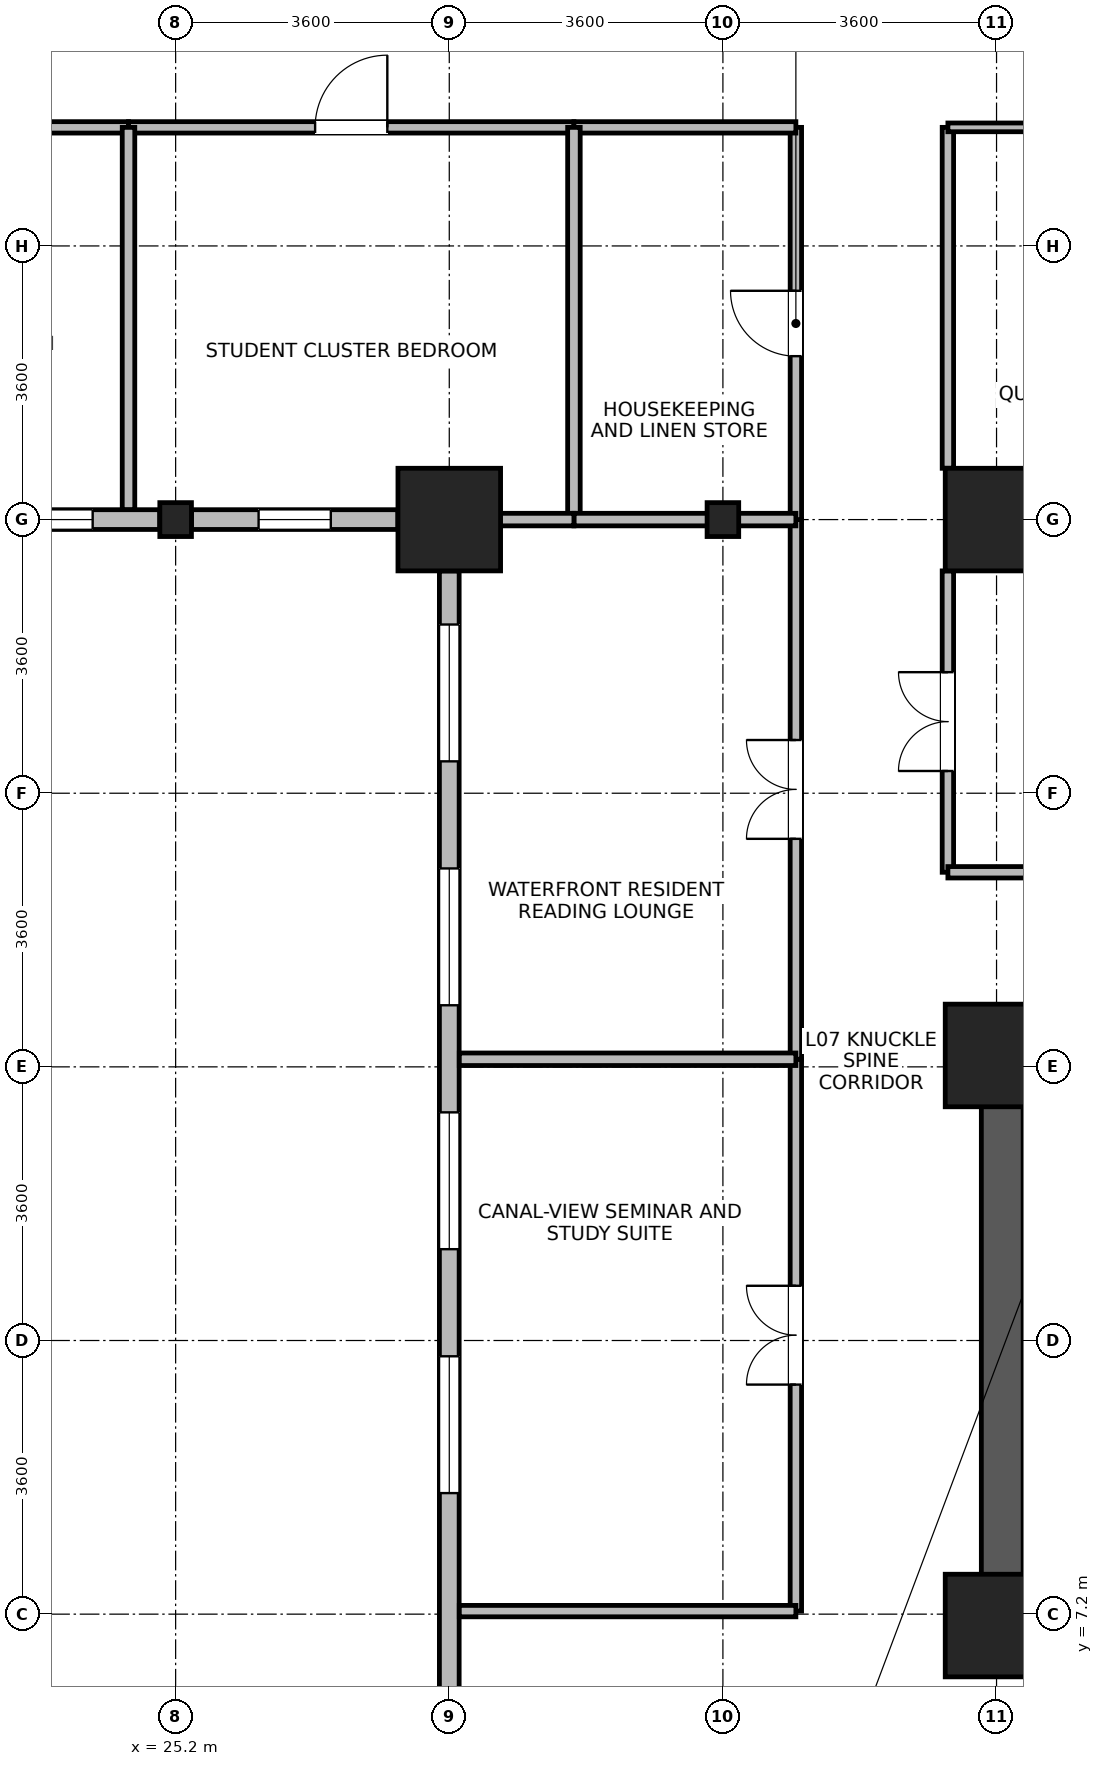
"""IFC4 building model, lengths in metres.
Left out: names, types, materials, properties, quantities, classifications, styles, units other than length and angle.
Written with IfcOpenShell. Run it as: python <this file> out.ifc"""

import sys

from ifc_helpers import new_model, si_unit, direction, frame, frame_2d, origin, origin_2d, place, context, subcontext, project, spatial, rectangle, i_section, extrude, source, transform, mapped, element, fill, save


model = new_model("IFC4")
c1 = context("Model", 3, precision=1e-05, world=origin(), true_north=direction((0.0, 1.0)))
c2 = subcontext(c1, "Body", "Model", "MODEL_VIEW")
j1 = project(units=[si_unit("LENGTHUNIT", "METRE"), si_unit("PLANEANGLEUNIT", "RADIAN")], contexts=[c1])
p1 = place(None, origin())
s1 = spatial("IfcSite", under=j1, at=p1, CompositionType="ELEMENT")
p2 = place(p1, origin())
s2 = spatial("IfcBuilding", under=s1, at=p2, CompositionType="ELEMENT")
p3 = place(p2, frame((0.0, 0.0, 32.7)))
s3 = spatial("IfcBuildingStorey", under=s2, at=p3, CompositionType="ELEMENT", Elevation=32.7)
p4 = place(p3, frame((36.075, 6.75, 0.0), z_axis=(0.0, 0.0, 1.0), x_axis=(0.0, 1.0, 0.0)))
e1 = element("IfcWall", 1, at=p4, inside=s3, PredefinedType="SHEAR", context=c2, shape_type="SweptSolid", body=[
    extrude(rectangle(XDim=8.1, YDim=0.55, at=frame_2d((4.05, 0.0))), origin(), (0.0, 0.0, 1.0), 3.45),
])
m1 = source(origin(), c2, "Body", "SweptSolid", [
    extrude(rectangle(XDim=1.35, YDim=1.35, at=origin_2d()), origin(), (0.0, 0.0, 1.0), 3.7),
])
for number, where, z_axis, x_axis in (
    (2, (28.8, 21.6, 0.0), (0.0, 0.0, 1.0), (1.0, 0.0, 0.0)),
    (3, (36.0, 21.6, 0.0), (0.0, 0.0, 1.0), (1.0, 0.0, 0.0)),
    (4, (36.0, 7.05, 0.0), (0.0, 0.0, 1.0), (1.0, 0.0, 0.0)),
    (5, (36.0, 14.55, 0.0), (0.0, 0.0, 1.0), (1.0, 0.0, 0.0)),
):
    element("IfcColumn", number, at=place(p3, frame(where, z_axis=z_axis, x_axis=x_axis)), inside=s3, PredefinedType="COLUMN", context=c2, shape_type="MappedRepresentation", body=[
        mapped(m1, transform((0.0, 0.0, 0.0), x_axis=(1.0, 0.0, 0.0), y_axis=(0.0, 1.0, 0.0), z_axis=(0.0, 0.0, 1.0), scale=1.0)),
    ])
m2 = source(origin(), c2, "Body", "SweptSolid", [
    extrude(i_section(OverallWidth=0.416, OverallDepth=0.446, WebThickness=0.029, FlangeThickness=0.04, FilletRadius=0.015, at=origin_2d()), origin(), (0.0, 0.0, 1.0), 3.7),
])
for number, where, z_axis, x_axis in (
    (6, (25.2, 21.6, 0.0), (0.0, 0.0, 1.0), (1.0, 0.0, 0.0)),
    (7, (32.4, 21.6, 0.0), (0.0, 0.0, 1.0), (1.0, 0.0, 0.0)),
):
    element("IfcColumn", number, at=place(p3, frame(where, z_axis=z_axis, x_axis=x_axis)), inside=s3, PredefinedType="COLUMN", context=c2, shape_type="MappedRepresentation", body=[
        mapped(m2, transform((0.0, 0.0, 0.0), x_axis=(1.0, 0.0, 0.0), y_axis=(0.0, 1.0, 0.0), z_axis=(0.0, 0.0, 1.0), scale=1.0)),
    ])
p5 = place(p3, frame((24.991, 21.6, 0.0), z_axis=(0.0, 0.0, 1.0), x_axis=(-1.0, 0.0, 0.0)))
e8 = element("IfcWall", 8, at=p5, inside=s3, PredefinedType="STANDARD", context=c2, shape_type="SweptSolid", body=[
    extrude(rectangle(XDim=2.715, YDim=0.26, at=frame_2d((1.357, 0.0))), origin(), (0.0, 0.0, 1.0), 2.93),
])
p6 = place(p5, frame((0.883, 0.0, 0.85)))
e9 = element("IfcOpeningElement", 9, at=p6, cuts=e8, PredefinedType="OPENING", context=c2, shape_type="SweptSolid", body=[
    extrude(rectangle(XDim=0.95, YDim=1.75, at=frame_2d((0.475, 0.875))), frame((0.0, 0.14, 0.0), z_axis=(0.0, -1.0, 0.0), x_axis=(1.0, 0.0, 0.0)), (0.0, 0.0, 1.0), 0.28),
])
p7 = place(p3, frame((28.124, 21.6, 0.0), z_axis=(0.0, 0.0, 1.0), x_axis=(-1.0, 0.0, 0.0)))
e10 = element("IfcWall", 10, at=p7, inside=s3, PredefinedType="STANDARD", context=c2, shape_type="SweptSolid", body=[
    extrude(rectangle(XDim=2.715, YDim=0.26, at=frame_2d((1.357, 0.0))), origin(), (0.0, 0.0, 1.0), 2.93),
])
p8 = place(p7, frame((0.883, 0.0, 0.85)))
e11 = element("IfcOpeningElement", 11, at=p8, cuts=e10, PredefinedType="OPENING", context=c2, shape_type="SweptSolid", body=[
    extrude(rectangle(XDim=0.95, YDim=1.75, at=frame_2d((0.475, 0.875))), frame((0.0, 0.14, 0.0), z_axis=(0.0, -1.0, 0.0), x_axis=(1.0, 0.0, 0.0)), (0.0, 0.0, 1.0), 0.28),
])
p9 = place(p3, frame((28.8, 1.67, 0.0), z_axis=(0.0, 0.0, 1.0), x_axis=(0.0, 1.0, 0.0)))
e12 = element("IfcWall", 12, at=p9, inside=s3, PredefinedType="STANDARD", context=c2, shape_type="SweptSolid", body=[
    extrude(rectangle(XDim=19.254, YDim=0.26, at=frame_2d((9.627, 0.0))), origin(), (0.0, 0.0, 1.0), 3.43),
])
p10 = place(p9, frame((0.705, 0.0, 0.85)))
e13 = element("IfcOpeningElement", 13, at=p10, cuts=e12, PredefinedType="OPENING", context=c2, shape_type="SweptSolid", body=[
    extrude(rectangle(XDim=1.8, YDim=1.85, at=frame_2d((0.9, 0.925))), frame((0.0, 0.14, 0.0), z_axis=(0.0, -1.0, 0.0), x_axis=(1.0, 0.0, 0.0)), (0.0, 0.0, 1.0), 0.28),
])
p11 = place(p9, frame((7.123, 0.0, 0.85)))
e14 = element("IfcOpeningElement", 14, at=p11, cuts=e12, PredefinedType="OPENING", context=c2, shape_type="SweptSolid", body=[
    extrude(rectangle(XDim=1.8, YDim=1.85, at=frame_2d((0.9, 0.925))), frame((0.0, 0.14, 0.0), z_axis=(0.0, -1.0, 0.0), x_axis=(1.0, 0.0, 0.0)), (0.0, 0.0, 1.0), 0.28),
])
p12 = place(p9, frame((10.332, 0.0, 0.85)))
e15 = element("IfcOpeningElement", 15, at=p12, cuts=e12, PredefinedType="OPENING", context=c2, shape_type="SweptSolid", body=[
    extrude(rectangle(XDim=1.8, YDim=1.85, at=frame_2d((0.9, 0.925))), frame((0.0, 0.14, 0.0), z_axis=(0.0, -1.0, 0.0), x_axis=(1.0, 0.0, 0.0)), (0.0, 0.0, 1.0), 0.28),
])
p13 = place(p9, frame((13.541, 0.0, 0.85)))
e16 = element("IfcOpeningElement", 16, at=p13, cuts=e12, PredefinedType="OPENING", context=c2, shape_type="SweptSolid", body=[
    extrude(rectangle(XDim=1.8, YDim=1.85, at=frame_2d((0.9, 0.925))), frame((0.0, 0.14, 0.0), z_axis=(0.0, -1.0, 0.0), x_axis=(1.0, 0.0, 0.0)), (0.0, 0.0, 1.0), 0.28),
])
p14 = place(p9, frame((16.75, 0.0, 0.85)))
e17 = element("IfcOpeningElement", 17, at=p14, cuts=e12, PredefinedType="OPENING", context=c2, shape_type="SweptSolid", body=[
    extrude(rectangle(XDim=1.8, YDim=1.85, at=frame_2d((0.9, 0.925))), frame((0.0, 0.14, 0.0), z_axis=(0.0, -1.0, 0.0), x_axis=(1.0, 0.0, 0.0)), (0.0, 0.0, 1.0), 0.28),
])
p15 = place(p3, frame((35.36, 16.96, 0.0), z_axis=(0.0, 0.0, 1.0), x_axis=(0.0, 1.0, 0.0)))
e18 = element("IfcWall", 18, at=p15, inside=s3, PredefinedType="PARTITIONING", context=c2, shape_type="SweptSolid", body=[
    extrude(rectangle(XDim=3.965, YDim=0.15, at=frame_2d((1.982, 0.0))), origin(), (0.0, 0.0, 1.0), 3.43),
])
p16 = place(p15, frame((1.333, 0.0, 0.0)))
e19 = element("IfcOpeningElement", 19, at=p16, cuts=e18, PredefinedType="OPENING", context=c2, shape_type="SweptSolid", body=[
    extrude(rectangle(XDim=1.3, YDim=2.12, at=frame_2d((0.65, 1.06))), frame((0.0, 0.085, 0.0), z_axis=(0.0, -1.0, 0.0), x_axis=(1.0, 0.0, 0.0)), (0.0, 0.0, 1.0), 0.17),
])
p17 = place(p3, frame((35.36, 22.275, 0.0), z_axis=(0.0, 0.0, 1.0), x_axis=(0.0, 1.0, 0.0)))
e20 = element("IfcWall", 20, at=p17, inside=s3, PredefinedType="PARTITIONING", context=c2, shape_type="SweptSolid", body=[
    extrude(rectangle(XDim=4.485, YDim=0.15, at=frame_2d((2.243, 0.0))), origin(), (0.0, 0.0, 1.0), 3.43),
])
p18 = place(p3, frame((33.36, 7.24, 0.0), z_axis=(0.0, 0.0, 1.0), x_axis=(0.0, 1.0, 0.0)))
e21 = element("IfcWall", 21, at=p18, inside=s3, PredefinedType="PARTITIONING", context=c2, shape_type="SweptSolid", body=[
    extrude(rectangle(XDim=7.26, YDim=0.15, at=frame_2d((3.63, 0.0))), origin(), (0.0, 0.0, 1.0), 3.43),
])
p19 = place(p18, frame((2.98, 0.0, 0.0)))
e22 = element("IfcOpeningElement", 22, at=p19, cuts=e21, PredefinedType="OPENING", context=c2, shape_type="SweptSolid", body=[
    extrude(rectangle(XDim=1.3, YDim=2.12, at=frame_2d((0.65, 1.06))), frame((0.0, 0.085, 0.0), z_axis=(0.0, -1.0, 0.0), x_axis=(1.0, 0.0, 0.0)), (0.0, 0.0, 1.0), 0.17),
])
p20 = place(p3, frame((33.36, 14.5, 0.0), z_axis=(0.0, 0.0, 1.0), x_axis=(0.0, 1.0, 0.0)))
e23 = element("IfcWall", 23, at=p20, inside=s3, PredefinedType="PARTITIONING", context=c2, shape_type="SweptSolid", body=[
    extrude(rectangle(XDim=7.1, YDim=0.15, at=frame_2d((3.55, 0.0))), origin(), (0.0, 0.0, 1.0), 3.43),
])
p21 = place(p20, frame((2.9, 0.0, 0.0)))
e24 = element("IfcOpeningElement", 24, at=p21, cuts=e23, PredefinedType="OPENING", context=c2, shape_type="SweptSolid", body=[
    extrude(rectangle(XDim=1.3, YDim=2.12, at=frame_2d((0.65, 1.06))), frame((0.0, 0.085, 0.0), z_axis=(0.0, -1.0, 0.0), x_axis=(1.0, 0.0, 0.0)), (0.0, 0.0, 1.0), 0.17),
])
p22 = place(p3, frame((18.2, 26.76, 0.0), z_axis=(0.0, 0.0, 1.0), x_axis=(1.0, 0.0, 0.0)))
e25 = element("IfcWall", 25, at=p22, inside=s3, PredefinedType="PARTITIONING", context=c2, shape_type="SweptSolid", body=[
    extrude(rectangle(XDim=6.38, YDim=0.15, at=frame_2d((3.19, 0.0))), origin(), (0.0, 0.0, 1.0), 3.43),
])
p23 = place(p22, frame((2.54, 0.0, 0.0)))
e26 = element("IfcOpeningElement", 26, at=p23, cuts=e25, PredefinedType="OPENING", context=c2, shape_type="SweptSolid", body=[
    extrude(rectangle(XDim=1.3, YDim=2.12, at=frame_2d((0.65, 1.06))), frame((0.0, 0.085, 0.0), z_axis=(0.0, -1.0, 0.0), x_axis=(1.0, 0.0, 0.0)), (0.0, 0.0, 1.0), 0.17),
])
p24 = place(p3, frame((24.58, 26.76, 0.0), z_axis=(0.0, 0.0, 1.0), x_axis=(1.0, 0.0, 0.0)))
e27 = element("IfcWall", 27, at=p24, inside=s3, PredefinedType="PARTITIONING", context=c2, shape_type="SweptSolid", body=[
    extrude(rectangle(XDim=5.86, YDim=0.15, at=frame_2d((2.93, 0.0))), origin(), (0.0, 0.0, 1.0), 3.43),
])
p25 = place(p24, frame((2.455, 0.0, 0.0)))
e28 = element("IfcOpeningElement", 28, at=p25, cuts=e27, PredefinedType="OPENING", context=c2, shape_type="SweptSolid", body=[
    extrude(rectangle(XDim=0.95, YDim=2.1, at=frame_2d((0.475, 1.05))), frame((0.0, 0.085, 0.0), z_axis=(0.0, -1.0, 0.0), x_axis=(1.0, 0.0, 0.0)), (0.0, 0.0, 1.0), 0.17),
])
p26 = place(p3, frame((33.36, 21.6, 0.0), z_axis=(0.0, 0.0, 1.0), x_axis=(0.0, 1.0, 0.0)))
e29 = element("IfcWall", 29, at=p26, inside=s3, PredefinedType="PARTITIONING", context=c2, shape_type="SweptSolid", body=[
    extrude(rectangle(XDim=5.16, YDim=0.15, at=frame_2d((2.58, 0.0))), origin(), (0.0, 0.0, 1.0), 3.43),
])
p27 = place(p26, frame((2.15, 0.0, 0.0)))
e30 = element("IfcOpeningElement", 30, at=p27, cuts=e29, PredefinedType="OPENING", context=c2, shape_type="SweptSolid", body=[
    extrude(rectangle(XDim=0.86, YDim=2.02, at=frame_2d((0.43, 1.01))), frame((0.0, 0.085, 0.0), z_axis=(0.0, -1.0, 0.0), x_axis=(1.0, 0.0, 0.0)), (0.0, 0.0, 1.0), 0.17),
])
p28 = place(p3, frame((35.36, 16.96, 0.0), z_axis=(0.0, 0.0, 1.0), x_axis=(1.0, 0.0, 0.0)))
e31 = element("IfcWall", 31, at=p28, inside=s3, PredefinedType="PARTITIONING", context=c2, shape_type="SweptSolid", body=[
    extrude(rectangle(XDim=4.92, YDim=0.15, at=frame_2d((2.46, 0.0))), origin(), (0.0, 0.0, 1.0), 3.43),
])
p29 = place(p3, frame((28.932, 7.24, 0.0), z_axis=(0.0, 0.0, 1.0), x_axis=(1.0, 0.0, 0.0)))
e32 = element("IfcWall", 32, at=p29, inside=s3, PredefinedType="PARTITIONING", context=c2, shape_type="SweptSolid", body=[
    extrude(rectangle(XDim=4.428, YDim=0.15, at=frame_2d((2.214, 0.0))), origin(), (0.0, 0.0, 1.0), 3.43),
])
p30 = place(p3, frame((30.44, 26.76, 0.0), z_axis=(0.0, 0.0, 1.0), x_axis=(1.0, 0.0, 0.0)))
e33 = element("IfcWall", 33, at=p30, inside=s3, PredefinedType="PARTITIONING", context=c2, shape_type="SweptSolid", body=[
    extrude(rectangle(XDim=2.92, YDim=0.15, at=frame_2d((1.46, 0.0))), origin(), (0.0, 0.0, 1.0), 3.43),
])
p31 = place(p3, frame((24.58, 21.732, 0.0), z_axis=(0.0, 0.0, 1.0), x_axis=(0.0, 1.0, 0.0)))
e34 = element("IfcWall", 34, at=p31, inside=s3, PredefinedType="PARTITIONING", context=c2, shape_type="SweptSolid", body=[
    extrude(rectangle(XDim=5.028, YDim=0.165, at=frame_2d((2.514, 0.0))), origin(), (0.0, 0.0, 1.0), 3.43),
])
p32 = place(p3, frame((30.44, 21.6, 0.0), z_axis=(0.0, 0.0, 1.0), x_axis=(0.0, 1.0, 0.0)))
e35 = element("IfcWall", 35, at=p32, inside=s3, PredefinedType="PARTITIONING", context=c2, shape_type="SweptSolid", body=[
    extrude(rectangle(XDim=5.16, YDim=0.165, at=frame_2d((2.58, 0.0))), origin(), (0.0, 0.0, 1.0), 3.43),
])
p33 = place(p3, frame((35.36, 26.76, 0.0), z_axis=(0.0, 0.0, 1.0), x_axis=(1.0, 0.0, 0.0)))
e36 = element("IfcWall", 36, at=p33, inside=s3, PredefinedType="PARTITIONING", context=c2, shape_type="SweptSolid", body=[
    extrude(rectangle(XDim=4.92, YDim=0.115, at=frame_2d((2.46, 0.0))), origin(), (0.0, 0.0, 1.0), 3.43),
])
p34 = place(p3, frame((28.932, 14.5, 0.0), z_axis=(0.0, 0.0, 1.0), x_axis=(1.0, 0.0, 0.0)))
e37 = element("IfcWall", 37, at=p34, inside=s3, PredefinedType="PARTITIONING", context=c2, shape_type="SweptSolid", body=[
    extrude(rectangle(XDim=4.428, YDim=0.165, at=frame_2d((2.214, 0.0))), origin(), (0.0, 0.0, 1.0), 3.43),
])
p35 = place(p3, frame((30.44, 21.6, 0.0), z_axis=(0.0, 0.0, 1.0), x_axis=(1.0, 0.0, 0.0)))
e38 = element("IfcWall", 38, at=p35, inside=s3, PredefinedType="PARTITIONING", context=c2, shape_type="SweptSolid", body=[
    extrude(rectangle(XDim=2.92, YDim=0.165, at=frame_2d((1.46, 0.0))), origin(), (0.0, 0.0, 1.0), 2.93),
])
p36 = place(p3, frame((28.932, 21.6, 0.0), z_axis=(0.0, 0.0, 1.0), x_axis=(1.0, 0.0, 0.0)))
e39 = element("IfcWall", 39, at=p36, inside=s3, PredefinedType="PARTITIONING", context=c2, shape_type="SweptSolid", body=[
    extrude(rectangle(XDim=1.508, YDim=0.165, at=frame_2d((0.754, 0.0))), origin(), (0.0, 0.0, 1.0), 2.93),
])
p37 = place(p6, origin())
e40 = element("IfcWindow", 40, at=p37, inside=s3, PartitioningType="SINGLE_PANEL", PredefinedType="WINDOW", context=c2, shape_type="SweptSolid", body=[
    extrude(rectangle(XDim=0.95, YDim=1.75, at=frame_2d((0.475, 0.875))), frame((0.0, 0.03, 0.0), z_axis=(0.0, -1.0, 0.0), x_axis=(1.0, 0.0, 0.0)), (0.0, 0.0, 1.0), 0.06),
])
fill(e9, e40)
p38 = place(p8, origin())
e41 = element("IfcWindow", 41, at=p38, inside=s3, PartitioningType="SINGLE_PANEL", PredefinedType="WINDOW", context=c2, shape_type="SweptSolid", body=[
    extrude(rectangle(XDim=0.95, YDim=1.75, at=frame_2d((0.475, 0.875))), frame((0.0, 0.03, 0.0), z_axis=(0.0, -1.0, 0.0), x_axis=(1.0, 0.0, 0.0)), (0.0, 0.0, 1.0), 0.06),
])
fill(e11, e41)
p39 = place(p11, origin())
e42 = element("IfcWindow", 42, at=p39, inside=s3, PartitioningType="SINGLE_PANEL", PredefinedType="WINDOW", context=c2, shape_type="SweptSolid", body=[
    extrude(rectangle(XDim=1.8, YDim=1.85, at=frame_2d((0.9, 0.925))), frame((0.0, 0.03, 0.0), z_axis=(0.0, -1.0, 0.0), x_axis=(1.0, 0.0, 0.0)), (0.0, 0.0, 1.0), 0.06),
])
fill(e14, e42)
p40 = place(p12, origin())
e43 = element("IfcWindow", 43, at=p40, inside=s3, PartitioningType="SINGLE_PANEL", PredefinedType="WINDOW", context=c2, shape_type="SweptSolid", body=[
    extrude(rectangle(XDim=1.8, YDim=1.85, at=frame_2d((0.9, 0.925))), frame((0.0, 0.03, 0.0), z_axis=(0.0, -1.0, 0.0), x_axis=(1.0, 0.0, 0.0)), (0.0, 0.0, 1.0), 0.06),
])
fill(e15, e43)
p41 = place(p13, origin())
e44 = element("IfcWindow", 44, at=p41, inside=s3, PartitioningType="SINGLE_PANEL", PredefinedType="WINDOW", context=c2, shape_type="SweptSolid", body=[
    extrude(rectangle(XDim=1.8, YDim=1.85, at=frame_2d((0.9, 0.925))), frame((0.0, 0.03, 0.0), z_axis=(0.0, -1.0, 0.0), x_axis=(1.0, 0.0, 0.0)), (0.0, 0.0, 1.0), 0.06),
])
fill(e16, e44)
p42 = place(p14, origin())
e45 = element("IfcWindow", 45, at=p42, inside=s3, PartitioningType="SINGLE_PANEL", PredefinedType="WINDOW", context=c2, shape_type="SweptSolid", body=[
    extrude(rectangle(XDim=1.8, YDim=1.85, at=frame_2d((0.9, 0.925))), frame((0.0, 0.03, 0.0), z_axis=(0.0, -1.0, 0.0), x_axis=(1.0, 0.0, 0.0)), (0.0, 0.0, 1.0), 0.06),
])
fill(e17, e45)
p43 = place(p16, origin())
e46 = element("IfcDoor", 46, at=p43, inside=s3, OperationType="DOUBLE_DOOR_SINGLE_SWING", PredefinedType="DOOR", context=c2, shape_type="SweptSolid", body=[
    extrude(rectangle(XDim=1.3, YDim=2.12, at=frame_2d((0.65, 1.06))), frame((0.0, 0.025, 0.0), z_axis=(0.0, -1.0, 0.0), x_axis=(1.0, 0.0, 0.0)), (0.0, 0.0, 1.0), 0.05),
])
fill(e19, e46)
p44 = place(p19, origin())
e47 = element("IfcDoor", 47, at=p44, inside=s3, OperationType="DOUBLE_DOOR_SINGLE_SWING", PredefinedType="DOOR", context=c2, shape_type="SweptSolid", body=[
    extrude(rectangle(XDim=1.3, YDim=2.12, at=frame_2d((0.65, 1.06))), frame((0.0, 0.025, 0.0), z_axis=(0.0, -1.0, 0.0), x_axis=(1.0, 0.0, 0.0)), (0.0, 0.0, 1.0), 0.05),
])
fill(e22, e47)
p45 = place(p21, origin())
e48 = element("IfcDoor", 48, at=p45, inside=s3, OperationType="DOUBLE_DOOR_SINGLE_SWING", PredefinedType="DOOR", context=c2, shape_type="SweptSolid", body=[
    extrude(rectangle(XDim=1.3, YDim=2.12, at=frame_2d((0.65, 1.06))), frame((0.0, 0.025, 0.0), z_axis=(0.0, -1.0, 0.0), x_axis=(1.0, 0.0, 0.0)), (0.0, 0.0, 1.0), 0.05),
])
fill(e24, e48)
p46 = place(p25, origin())
e49 = element("IfcDoor", 49, at=p46, inside=s3, OperationType="SINGLE_SWING_RIGHT", PredefinedType="DOOR", context=c2, shape_type="SweptSolid", body=[
    extrude(rectangle(XDim=0.95, YDim=2.1, at=frame_2d((0.475, 1.05))), frame((0.0, 0.025, 0.0), z_axis=(0.0, -1.0, 0.0), x_axis=(1.0, 0.0, 0.0)), (0.0, 0.0, 1.0), 0.05),
])
fill(e28, e49)
p47 = place(p27, origin())
e50 = element("IfcDoor", 50, at=p47, inside=s3, OperationType="SINGLE_SWING_RIGHT", PredefinedType="DOOR", context=c2, shape_type="SweptSolid", body=[
    extrude(rectangle(XDim=0.86, YDim=2.02, at=frame_2d((0.43, 1.01))), frame((0.0, 0.025, 0.0), z_axis=(0.0, -1.0, 0.0), x_axis=(1.0, 0.0, 0.0)), (0.0, 0.0, 1.0), 0.05),
])
fill(e30, e50)
save(model, sys.argv[1])
